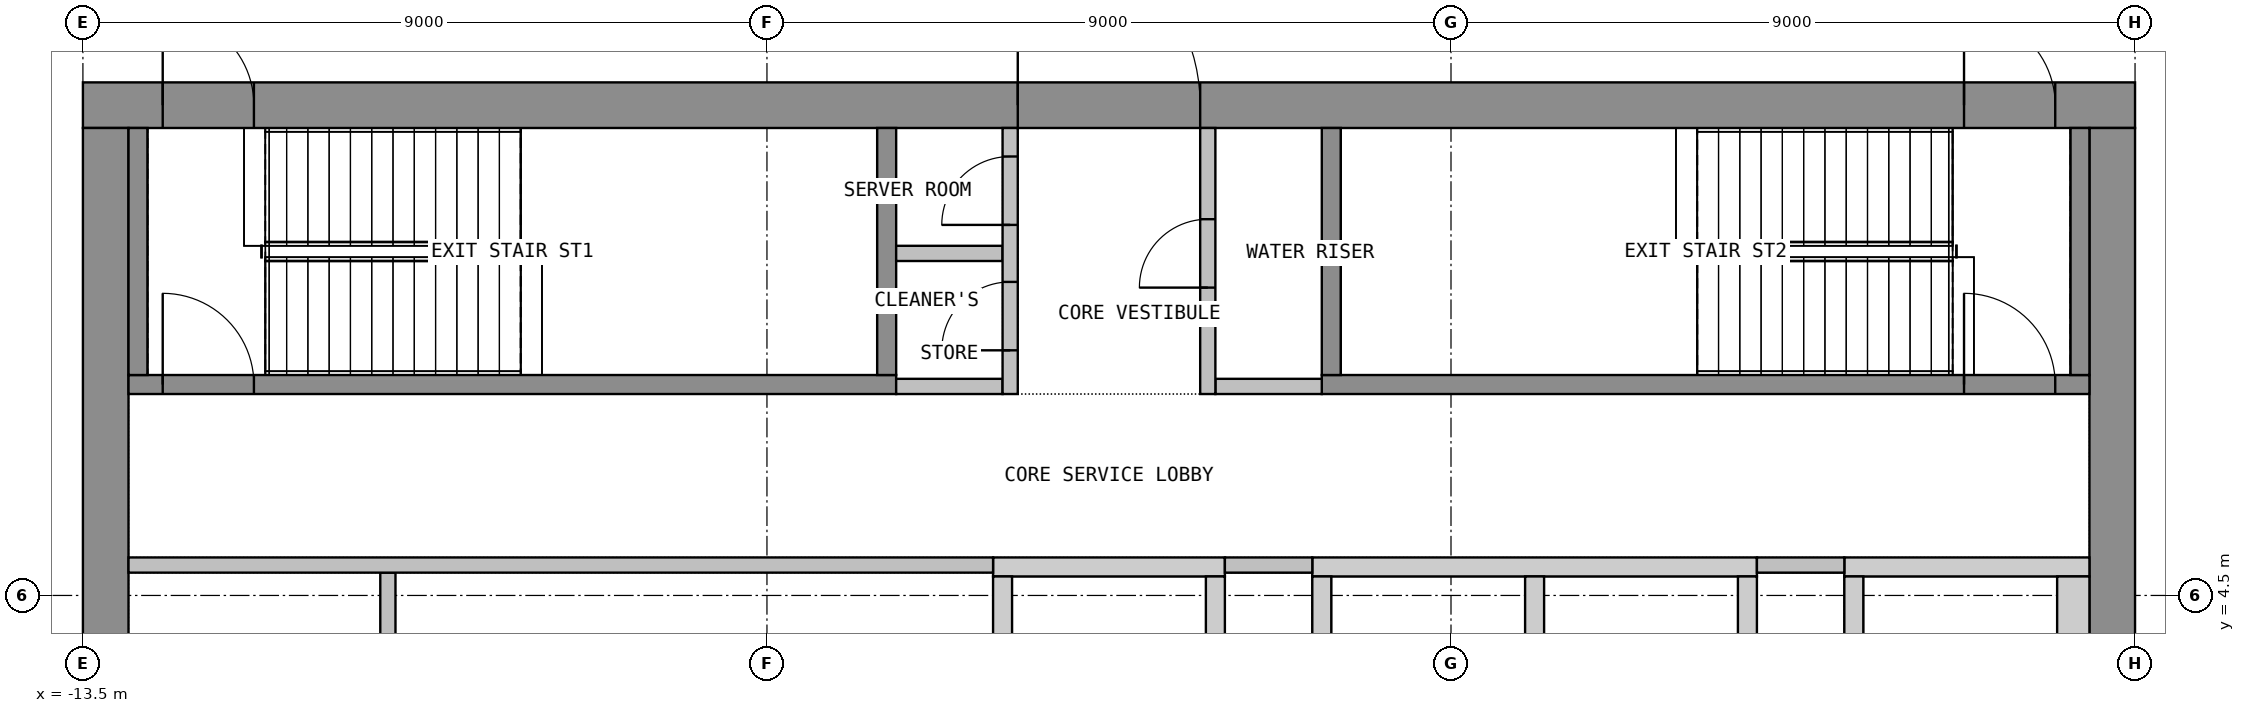
"""IFC4 building model, lengths in metres.
Left out: names, types, materials, properties, quantities, classifications, styles, units other than length and angle.
Written with IfcOpenShell. Run it as: python <this file> out.ifc"""

import sys

from ifc_helpers import new_model, si_unit, direction, frame, frame_2d, origin, place, context, subcontext, project, spatial, polyline, rectangle, outline, extrude, element, fill, save


model = new_model("IFC4")
c1 = context("Model", 3, precision=1e-05, world=origin(), true_north=direction((0.0, 1.0)))
c2 = subcontext(c1, "Body", "Model", "MODEL_VIEW")
j1 = project(units=[si_unit("LENGTHUNIT", "METRE"), si_unit("PLANEANGLEUNIT", "RADIAN")], contexts=[c1])
p1 = place(None, origin())
s1 = spatial("IfcSite", under=j1, at=p1, CompositionType="ELEMENT")
p2 = place(p1, origin())
s2 = spatial("IfcBuilding", under=s1, at=p2, CompositionType="ELEMENT")
p3 = place(p2, frame((0.0, 0.0, 309.9)))
s3 = spatial("IfcBuildingStorey", under=s2, at=p3, CompositionType="ELEMENT", Elevation=309.9)
p4 = place(p3, frame((-13.5, 10.95, 0.0), z_axis=(0.0, 0.0, 1.0), x_axis=(1.0, 0.0, 0.0)))
e1 = element("IfcWall", 1, at=p4, inside=s3, PredefinedType="SHEAR", context=c2, shape_type="SweptSolid", body=[
    extrude(rectangle(XDim=27.0, YDim=0.6, at=frame_2d((13.5, 0.0))), origin(), (0.0, 0.0, 1.0), 8.55),
])
p5 = place(p4, frame((12.3, 0.0, 0.0)))
e2 = element("IfcOpeningElement", 2, at=p5, cuts=e1, PredefinedType="OPENING", context=c2, shape_type="SweptSolid", body=[
    extrude(rectangle(XDim=2.4, YDim=2.1, at=frame_2d((1.2, 1.05))), frame((0.0, 0.31, 0.0), z_axis=(0.0, -1.0, 0.0), x_axis=(1.0, 0.0, 0.0)), (0.0, 0.0, 1.0), 0.62),
])
p6 = place(p4, frame((1.05, 0.0, 0.0)))
e3 = element("IfcOpeningElement", 3, at=p6, cuts=e1, PredefinedType="OPENING", context=c2, shape_type="SweptSolid", body=[
    extrude(rectangle(XDim=1.2, YDim=2.1, at=frame_2d((0.6, 1.05))), frame((0.0, 0.31, 0.0), z_axis=(0.0, -1.0, 0.0), x_axis=(1.0, 0.0, 0.0)), (0.0, 0.0, 1.0), 0.62),
])
p7 = place(p4, frame((24.75, 0.0, 0.0)))
e4 = element("IfcOpeningElement", 4, at=p7, cuts=e1, PredefinedType="OPENING", context=c2, shape_type="SweptSolid", body=[
    extrude(rectangle(XDim=1.2, YDim=2.1, at=frame_2d((0.6, 1.05))), frame((0.0, 0.31, 0.0), z_axis=(0.0, -1.0, 0.0), x_axis=(1.0, 0.0, 0.0)), (0.0, 0.0, 1.0), 0.62),
])
p8 = place(p3, frame((-13.2, -10.65, 0.0), z_axis=(0.0, 0.0, 1.0), x_axis=(0.0, 1.0, 0.0)))
e5 = element("IfcWall", 5, at=p8, inside=s3, PredefinedType="SHEAR", context=c2, shape_type="SweptSolid", body=[
    extrude(rectangle(XDim=21.3, YDim=0.6, at=frame_2d((10.65, 0.0))), origin(), (0.0, 0.0, 1.0), 8.55),
])
p9 = place(p8, frame((9.45, 0.0, 0.0)))
e6 = element("IfcOpeningElement", 6, at=p9, cuts=e5, PredefinedType="OPENING", context=c2, shape_type="SweptSolid", body=[
    extrude(rectangle(XDim=2.4, YDim=2.1, at=frame_2d((1.2, 1.05))), frame((0.0, 0.31, 0.0), z_axis=(0.0, -1.0, 0.0), x_axis=(1.0, 0.0, 0.0)), (0.0, 0.0, 1.0), 0.62),
])
p10 = place(p3, frame((13.2, -10.65, 0.0), z_axis=(0.0, 0.0, 1.0), x_axis=(0.0, 1.0, 0.0)))
e7 = element("IfcWall", 7, at=p10, inside=s3, PredefinedType="SHEAR", context=c2, shape_type="SweptSolid", body=[
    extrude(rectangle(XDim=21.3, YDim=0.6, at=frame_2d((10.65, 0.0))), origin(), (0.0, 0.0, 1.0), 8.55),
])
p11 = place(p10, frame((9.45, 0.0, 0.0)))
e8 = element("IfcOpeningElement", 8, at=p11, cuts=e7, PredefinedType="OPENING", context=c2, shape_type="SweptSolid", body=[
    extrude(rectangle(XDim=2.4, YDim=2.1, at=frame_2d((1.2, 1.05))), frame((0.0, 0.31, 0.0), z_axis=(0.0, -1.0, 0.0), x_axis=(1.0, 0.0, 0.0)), (0.0, 0.0, 1.0), 0.62),
])
p12 = place(p3, origin())
e9 = element("IfcWall", 9, at=p12, inside=s3, PredefinedType="SHEAR", context=c2, shape_type="SweptSolid", body=[
    extrude(outline(polyline([(-1.525, 4.75), (1.525, 4.75), (1.525, 5.0), (-1.525, 5.0), (-1.525, 4.75)])), origin(), (0.0, 0.0, 1.0), 8.55),
])
p13 = place(p3, origin())
e10 = element("IfcWall", 10, at=p13, inside=s3, PredefinedType="SHEAR", context=c2, shape_type="SweptSolid", body=[
    extrude(outline(polyline([(2.675, 4.75), (8.525, 4.75), (8.525, 5.0), (2.675, 5.0), (2.675, 4.75)])), origin(), (0.0, 0.0, 1.0), 8.55),
])
p14 = place(p3, origin())
e11 = element("IfcWall", 11, at=p14, inside=s3, PredefinedType="SHEAR", context=c2, shape_type="SweptSolid", body=[
    extrude(outline(polyline([(9.675, 4.75), (12.9, 4.75), (12.9, 5.0), (9.675, 5.0), (9.675, 4.75)])), origin(), (0.0, 0.0, 1.0), 8.55),
])
p15 = place(p3, origin())
e12 = element("IfcWall", 12, at=p15, inside=s3, PredefinedType="SHEAR", context=c2, shape_type="SweptSolid", body=[
    extrude(outline(polyline([(-1.525, 2.05), (-1.275, 2.05), (-1.275, 4.75), (-1.525, 4.75), (-1.525, 2.05)])), origin(), (0.0, 0.0, 1.0), 8.55),
])
p16 = place(p3, origin())
e13 = element("IfcWall", 13, at=p16, inside=s3, PredefinedType="SHEAR", context=c2, shape_type="SweptSolid", body=[
    extrude(outline(polyline([(1.275, 2.05), (1.525, 2.05), (1.525, 4.75), (1.275, 4.75), (1.275, 2.05)])), origin(), (0.0, 0.0, 1.0), 8.55),
])
p17 = place(p3, origin())
e14 = element("IfcWall", 14, at=p17, inside=s3, PredefinedType="SHEAR", context=c2, shape_type="SweptSolid", body=[
    extrude(outline(polyline([(2.675, 2.05), (2.925, 2.05), (2.925, 4.75), (2.675, 4.75), (2.675, 2.05)])), origin(), (0.0, 0.0, 1.0), 8.55),
])
p18 = place(p3, origin())
e15 = element("IfcWall", 15, at=p18, inside=s3, PredefinedType="SHEAR", context=c2, shape_type="SweptSolid", body=[
    extrude(outline(polyline([(5.475, 2.05), (5.725, 2.05), (5.725, 4.75), (5.475, 4.75), (5.475, 2.05)])), origin(), (0.0, 0.0, 1.0), 8.55),
])
p19 = place(p3, origin())
e16 = element("IfcWall", 16, at=p19, inside=s3, PredefinedType="SHEAR", context=c2, shape_type="SweptSolid", body=[
    extrude(outline(polyline([(8.275, 2.05), (8.525, 2.05), (8.525, 4.75), (8.275, 4.75), (8.275, 2.05)])), origin(), (0.0, 0.0, 1.0), 8.55),
])
p20 = place(p3, origin())
e17 = element("IfcWall", 17, at=p20, inside=s3, PredefinedType="SHEAR", context=c2, shape_type="SweptSolid", body=[
    extrude(outline(polyline([(9.675, 2.05), (9.925, 2.05), (9.925, 4.75), (9.675, 4.75), (9.675, 2.05)])), origin(), (0.0, 0.0, 1.0), 8.55),
])
p21 = place(p3, origin())
e18 = element("IfcWall", 18, at=p21, inside=s3, PredefinedType="SHEAR", context=c2, shape_type="SweptSolid", body=[
    extrude(outline(polyline([(12.475, 2.05), (12.9, 2.05), (12.9, 4.75), (12.475, 4.75), (12.475, 2.05)])), origin(), (0.0, 0.0, 1.0), 8.55),
])
p22 = place(p3, frame((-12.9, 7.275, 0.0), z_axis=(0.0, 0.0, 1.0), x_axis=(1.0, 0.0, 0.0)))
e19 = element("IfcWall", 19, at=p22, inside=s3, PredefinedType="SHEAR", context=c2, shape_type="SweptSolid", body=[
    extrude(rectangle(XDim=10.1, YDim=0.25, at=frame_2d((5.05, 0.0))), origin(), (0.0, 0.0, 1.0), 8.55),
])
p23 = place(p22, frame((0.45, 0.0, 0.0)))
e20 = element("IfcOpeningElement", 20, at=p23, cuts=e19, PredefinedType="OPENING", context=c2, shape_type="SweptSolid", body=[
    extrude(rectangle(XDim=1.2, YDim=2.1, at=frame_2d((0.6, 1.05))), frame((0.0, 0.135, 0.0), z_axis=(0.0, -1.0, 0.0), x_axis=(1.0, 0.0, 0.0)), (0.0, 0.0, 1.0), 0.27),
])
for number, where, z_axis, x_axis in (
    (21, (-12.775, 7.4, 0.0), (0.0, 0.0, 1.0), (0.0, 1.0, 0.0)),
    (22, (-2.925, 7.4, 0.0), (0.0, 0.0, 1.0), (0.0, 1.0, 0.0)),
):
    element("IfcWall", number, at=place(p3, frame(where, z_axis=z_axis, x_axis=x_axis)), inside=s3, PredefinedType="SHEAR", context=c2, shape_type="SweptSolid", body=[
        extrude(rectangle(XDim=3.25, YDim=0.25, at=frame_2d((1.625, 0.0))), origin(), (0.0, 0.0, 1.0), 8.55),
    ])
p24 = place(p3, frame((2.8, 7.275, 0.0), z_axis=(0.0, 0.0, 1.0), x_axis=(1.0, 0.0, 0.0)))
e23 = element("IfcWall", 23, at=p24, inside=s3, PredefinedType="SHEAR", context=c2, shape_type="SweptSolid", body=[
    extrude(rectangle(XDim=10.1, YDim=0.25, at=frame_2d((5.05, 0.0))), origin(), (0.0, 0.0, 1.0), 8.55),
])
p25 = place(p24, frame((8.45, 0.0, 0.0)))
e24 = element("IfcOpeningElement", 24, at=p25, cuts=e23, PredefinedType="OPENING", context=c2, shape_type="SweptSolid", body=[
    extrude(rectangle(XDim=1.2, YDim=2.1, at=frame_2d((0.6, 1.05))), frame((0.0, 0.135, 0.0), z_axis=(0.0, -1.0, 0.0), x_axis=(1.0, 0.0, 0.0)), (0.0, 0.0, 1.0), 0.27),
])
for number, where, z_axis, x_axis in (
    (25, (2.925, 7.4, 0.0), (0.0, 0.0, 1.0), (0.0, 1.0, 0.0)),
    (26, (12.775, 7.4, 0.0), (0.0, 0.0, 1.0), (0.0, 1.0, 0.0)),
):
    element("IfcWall", number, at=place(p3, frame(where, z_axis=z_axis, x_axis=x_axis)), inside=s3, PredefinedType="SHEAR", context=c2, shape_type="SweptSolid", body=[
        extrude(rectangle(XDim=3.25, YDim=0.25, at=frame_2d((1.625, 0.0))), origin(), (0.0, 0.0, 1.0), 8.55),
    ])
for number, where, z_axis, x_axis in (
    (27, (-2.8, 7.25, 0.0), (0.0, 0.0, 1.0), (1.0, 0.0, 0.0)),
    (28, (-2.8, 9.0, 0.0), (0.0, 0.0, 1.0), (1.0, 0.0, 0.0)),
    (29, (1.4, 7.25, 0.0), (0.0, 0.0, 1.0), (1.0, 0.0, 0.0)),
):
    element("IfcWall", number, at=place(p3, frame(where, z_axis=z_axis, x_axis=x_axis)), inside=s3, PredefinedType="PARTITIONING", context=c2, shape_type="SweptSolid", body=[
        extrude(rectangle(XDim=1.4, YDim=0.2, at=frame_2d((0.7, 0.0))), origin(), (0.0, 0.0, 1.0), 8.55),
    ])
p26 = place(p3, frame((-1.3, 7.15, 0.0), z_axis=(0.0, 0.0, 1.0), x_axis=(0.0, 1.0, 0.0)))
e30 = element("IfcWall", 30, at=p26, inside=s3, PredefinedType="PARTITIONING", context=c2, shape_type="SweptSolid", body=[
    extrude(rectangle(XDim=3.5, YDim=0.2, at=frame_2d((1.75, 0.0))), origin(), (0.0, 0.0, 1.0), 8.55),
])
p27 = place(p26, frame((0.575, 0.0, 0.0)))
e31 = element("IfcOpeningElement", 31, at=p27, cuts=e30, PredefinedType="OPENING", context=c2, shape_type="SweptSolid", body=[
    extrude(rectangle(XDim=0.9, YDim=2.1, at=frame_2d((0.45, 1.05))), frame((0.0, 0.11, 0.0), z_axis=(0.0, -1.0, 0.0), x_axis=(1.0, 0.0, 0.0)), (0.0, 0.0, 1.0), 0.22),
])
p28 = place(p26, frame((2.225, 0.0, 0.0)))
e32 = element("IfcOpeningElement", 32, at=p28, cuts=e30, PredefinedType="OPENING", context=c2, shape_type="SweptSolid", body=[
    extrude(rectangle(XDim=0.9, YDim=2.1, at=frame_2d((0.45, 1.05))), frame((0.0, 0.11, 0.0), z_axis=(0.0, -1.0, 0.0), x_axis=(1.0, 0.0, 0.0)), (0.0, 0.0, 1.0), 0.22),
])
p29 = place(p3, frame((1.3, 7.15, 0.0), z_axis=(0.0, 0.0, 1.0), x_axis=(0.0, 1.0, 0.0)))
e33 = element("IfcWall", 33, at=p29, inside=s3, PredefinedType="PARTITIONING", context=c2, shape_type="SweptSolid", body=[
    extrude(rectangle(XDim=3.5, YDim=0.2, at=frame_2d((1.75, 0.0))), origin(), (0.0, 0.0, 1.0), 8.55),
])
p30 = place(p29, frame((1.4, 0.0, 0.0)))
e34 = element("IfcOpeningElement", 34, at=p30, cuts=e33, PredefinedType="OPENING", context=c2, shape_type="SweptSolid", body=[
    extrude(rectangle(XDim=0.9, YDim=2.1, at=frame_2d((0.45, 1.05))), frame((0.0, 0.11, 0.0), z_axis=(0.0, -1.0, 0.0), x_axis=(1.0, 0.0, 0.0)), (0.0, 0.0, 1.0), 0.22),
])
p31 = place(p3, frame((-9.488, 2.0, 0.0), z_axis=(0.0, 0.0, 1.0), x_axis=(0.0, 1.0, 0.0)))
e35 = element("IfcWall", 35, at=p31, inside=s3, PredefinedType="PARTITIONING", context=c2, shape_type="SweptSolid", body=[
    extrude(rectangle(XDim=2.8, YDim=0.2, at=frame_2d((1.4, 0.0))), origin(), (0.0, 0.0, 1.0), 8.55),
])
p32 = place(p3, frame((-12.9, 4.9, 0.0), z_axis=(0.0, 0.0, 1.0), x_axis=(1.0, 0.0, 0.0)))
e36 = element("IfcWall", 36, at=p32, inside=s3, PredefinedType="PARTITIONING", context=c2, shape_type="SweptSolid", body=[
    extrude(rectangle(XDim=11.375, YDim=0.2, at=frame_2d((5.688, 0.0))), origin(), (0.0, 0.0, 1.0), 8.55),
])
for number, where, z_axis, x_axis in (
    (37, (1.525, 4.9, 0.0), (0.0, 0.0, 1.0), (1.0, 0.0, 0.0)),
    (38, (8.525, 4.9, 0.0), (0.0, 0.0, 1.0), (1.0, 0.0, 0.0)),
):
    element("IfcWall", number, at=place(p3, frame(where, z_axis=z_axis, x_axis=x_axis)), inside=s3, PredefinedType="PARTITIONING", context=c2, shape_type="SweptSolid", body=[
        extrude(rectangle(XDim=1.15, YDim=0.2, at=frame_2d((0.575, 0.0))), origin(), (0.0, 0.0, 1.0), 8.55),
    ])
p33 = place(p5, origin())
e39 = element("IfcDoor", 39, at=p33, inside=s3, OperationType="DOUBLE_DOOR_DOUBLE_SWING", PredefinedType="DOOR", context=c2, shape_type="SweptSolid", body=[
    extrude(rectangle(XDim=2.4, YDim=2.1, at=frame_2d((1.2, 1.05))), frame((0.0, 0.025, 0.0), z_axis=(0.0, -1.0, 0.0), x_axis=(1.0, 0.0, 0.0)), (0.0, 0.0, 1.0), 0.05),
])
fill(e2, e39)
p34 = place(p6, origin())
e40 = element("IfcDoor", 40, at=p34, inside=s3, OperationType="SINGLE_SWING_RIGHT", PredefinedType="DOOR", context=c2, shape_type="SweptSolid", body=[
    extrude(rectangle(XDim=1.2, YDim=2.1, at=frame_2d((0.6, 1.05))), frame((0.0, 0.025, 0.0), z_axis=(0.0, -1.0, 0.0), x_axis=(1.0, 0.0, 0.0)), (0.0, 0.0, 1.0), 0.05),
])
fill(e3, e40)
p35 = place(p7, origin())
e41 = element("IfcDoor", 41, at=p35, inside=s3, OperationType="SINGLE_SWING_RIGHT", PredefinedType="DOOR", context=c2, shape_type="SweptSolid", body=[
    extrude(rectangle(XDim=1.2, YDim=2.1, at=frame_2d((0.6, 1.05))), frame((0.0, 0.025, 0.0), z_axis=(0.0, -1.0, 0.0), x_axis=(1.0, 0.0, 0.0)), (0.0, 0.0, 1.0), 0.05),
])
fill(e4, e41)
p36 = place(p23, origin())
e42 = element("IfcDoor", 42, at=p36, inside=s3, OperationType="SINGLE_SWING_LEFT", PredefinedType="DOOR", context=c2, shape_type="SweptSolid", body=[
    extrude(rectangle(XDim=1.2, YDim=2.1, at=frame_2d((0.6, 1.05))), frame((0.0, 0.025, 0.0), z_axis=(0.0, -1.0, 0.0), x_axis=(1.0, 0.0, 0.0)), (0.0, 0.0, 1.0), 0.05),
])
fill(e20, e42)
p37 = place(p25, origin())
e43 = element("IfcDoor", 43, at=p37, inside=s3, OperationType="SINGLE_SWING_LEFT", PredefinedType="DOOR", context=c2, shape_type="SweptSolid", body=[
    extrude(rectangle(XDim=1.2, YDim=2.1, at=frame_2d((0.6, 1.05))), frame((0.0, 0.025, 0.0), z_axis=(0.0, -1.0, 0.0), x_axis=(1.0, 0.0, 0.0)), (0.0, 0.0, 1.0), 0.05),
])
fill(e24, e43)
p38 = place(p27, origin())
e44 = element("IfcDoor", 44, at=p38, inside=s3, OperationType="SINGLE_SWING_LEFT", PredefinedType="DOOR", context=c2, shape_type="SweptSolid", body=[
    extrude(rectangle(XDim=0.9, YDim=2.1, at=frame_2d((0.45, 1.05))), frame((0.0, 0.025, 0.0), z_axis=(0.0, -1.0, 0.0), x_axis=(1.0, 0.0, 0.0)), (0.0, 0.0, 1.0), 0.05),
])
fill(e31, e44)
p39 = place(p28, origin())
e45 = element("IfcDoor", 45, at=p39, inside=s3, OperationType="SINGLE_SWING_LEFT", PredefinedType="DOOR", context=c2, shape_type="SweptSolid", body=[
    extrude(rectangle(XDim=0.9, YDim=2.1, at=frame_2d((0.45, 1.05))), frame((0.0, 0.025, 0.0), z_axis=(0.0, -1.0, 0.0), x_axis=(1.0, 0.0, 0.0)), (0.0, 0.0, 1.0), 0.05),
])
fill(e32, e45)
p40 = place(p30, origin())
e46 = element("IfcDoor", 46, at=p40, inside=s3, OperationType="SINGLE_SWING_LEFT", PredefinedType="DOOR", context=c2, shape_type="SweptSolid", body=[
    extrude(rectangle(XDim=0.9, YDim=2.1, at=frame_2d((0.45, 1.05))), frame((0.0, 0.025, 0.0), z_axis=(0.0, -1.0, 0.0), x_axis=(1.0, 0.0, 0.0)), (0.0, 0.0, 1.0), 0.05),
])
fill(e34, e46)
save(model, sys.argv[1])
